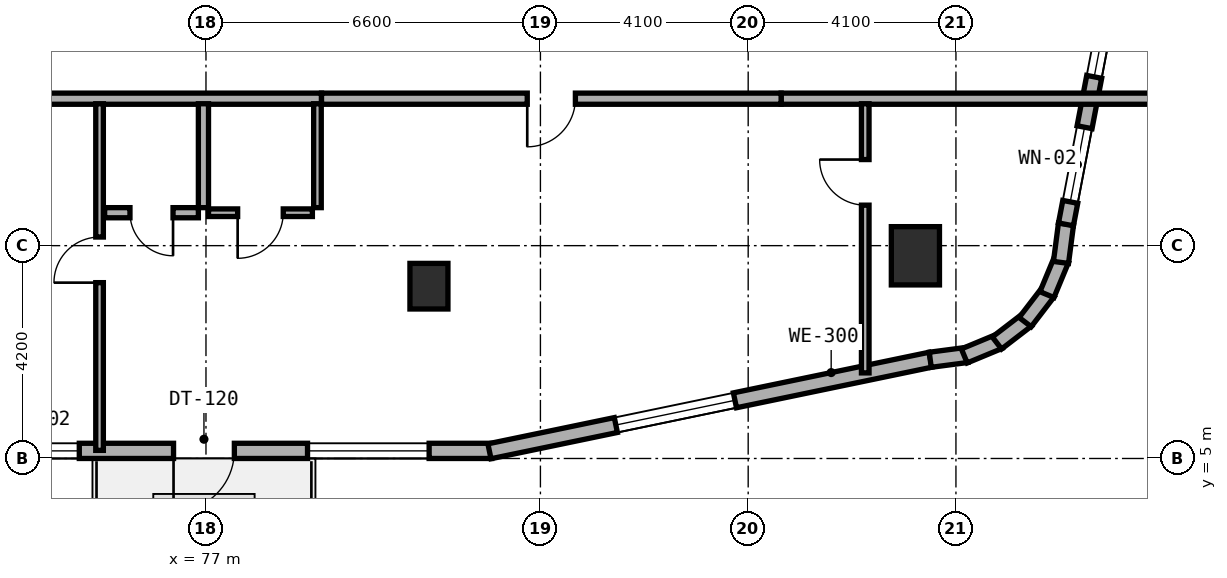
"""IFC4 building model, lengths in metres.
Left out: names, types, materials, properties, quantities, classifications, styles, units other than length and angle.
Written with IfcOpenShell. Run it as: python <this file> out.ifc"""

import sys

from ifc_helpers import new_model, si_unit, direction, frame, frame_2d, origin, origin_2d, place, context, subcontext, project, spatial, rectangle, extrude, element, fill, save


model = new_model("IFC4")
c1 = context("Model", 3, precision=1e-05, world=origin(), true_north=direction((0.0, 1.0)))
c2 = subcontext(c1, "Body", "Model", "MODEL_VIEW")
j1 = project(units=[si_unit("LENGTHUNIT", "METRE"), si_unit("PLANEANGLEUNIT", "RADIAN")], contexts=[c1])
p1 = place(None, origin())
s1 = spatial("IfcSite", under=j1, at=p1, CompositionType="ELEMENT")
p2 = place(p1, origin())
s2 = spatial("IfcBuilding", under=s1, at=p2, CompositionType="ELEMENT")
p3 = place(p2, frame((0.0, 0.0, 69.5)))
s3 = spatial("IfcBuildingStorey", under=s2, at=p3, CompositionType="ELEMENT", Elevation=69.5)
p4 = place(p3, frame((81.4, 8.4, 0.0), z_axis=(0.0, 0.0, 1.0), x_axis=(1.0, 0.0, 0.0)))
e1 = element("IfcColumn", 1, at=p4, inside=s3, PredefinedType="COLUMN", context=c2, shape_type="SweptSolid", body=[
    extrude(rectangle(XDim=0.75, YDim=0.9, at=origin_2d()), origin(), (0.0, 0.0, 1.0), 3.5),
])
p5 = place(p3, frame((91.0, 9.0, 0.0), z_axis=(0.0, 0.0, 1.0), x_axis=(1.0, 0.0, 0.0)))
e2 = element("IfcColumn", 2, at=p5, inside=s3, PredefinedType="COLUMN", context=c2, shape_type="SweptSolid", body=[
    extrude(rectangle(XDim=0.95, YDim=1.15, at=origin_2d()), origin(), (0.0, 0.0, 1.0), 3.5),
])
p6 = place(p3, frame((71.247, 5.15, 0.0), z_axis=(0.0, 0.0, 1.0), x_axis=(1.0, 0.0, 0.0)))
e3 = element("IfcWall", 3, at=p6, inside=s3, PredefinedType="STANDARD", context=c2, shape_type="SweptSolid", body=[
    extrude(rectangle(XDim=11.391, YDim=0.3, at=frame_2d((5.695, 0.0))), origin(), (0.0, 0.0, 1.0), 3.25),
])
p7 = place(p6, frame((5.113, 0.0, 0.0)))
e4 = element("IfcOpeningElement", 4, at=p7, cuts=e3, PredefinedType="OPENING", context=c2, shape_type="SweptSolid", body=[
    extrude(rectangle(XDim=1.2, YDim=2.15, at=frame_2d((0.6, 1.075))), frame((0.0, 0.16, 0.0), z_axis=(0.0, -1.0, 0.0), x_axis=(1.0, 0.0, 0.0)), (0.0, 0.0, 1.0), 0.32),
])
p8 = place(p6, frame((1.753, 0.0, 0.85)))
e5 = element("IfcOpeningElement", 5, at=p8, cuts=e3, PredefinedType="OPENING", context=c2, shape_type="SweptSolid", body=[
    extrude(rectangle(XDim=1.5, YDim=1.5, at=frame_2d((0.75, 0.75))), frame((0.0, 0.16, 0.0), z_axis=(0.0, -1.0, 0.0), x_axis=(1.0, 0.0, 0.0)), (0.0, 0.0, 1.0), 0.32),
])
p9 = place(p6, frame((7.757, 0.0, 0.8)))
e6 = element("IfcOpeningElement", 6, at=p9, cuts=e3, PredefinedType="OPENING", context=c2, shape_type="SweptSolid", body=[
    extrude(rectangle(XDim=2.4, YDim=1.6, at=frame_2d((1.2, 0.8))), frame((0.0, 0.16, 0.0), z_axis=(0.0, -1.0, 0.0), x_axis=(1.0, 0.0, 0.0)), (0.0, 0.0, 1.0), 0.32),
])
p10 = place(p3, frame((82.594, 5.142, 0.0), z_axis=(0.0, 0.0, 1.0), x_axis=(0.979125485139, 0.203256695712, 0.0)))
e7 = element("IfcWall", 7, at=p10, inside=s3, PredefinedType="STANDARD", context=c2, shape_type="SweptSolid", body=[
    extrude(rectangle(XDim=8.89, YDim=0.3, at=frame_2d((4.445, 0.0))), origin(), (0.0, 0.0, 1.0), 3.25),
])
p11 = place(p10, frame((2.548, 0.0, 0.8)))
e8 = element("IfcOpeningElement", 8, at=p11, cuts=e7, PredefinedType="OPENING", context=c2, shape_type="SweptSolid", body=[
    extrude(rectangle(XDim=2.4, YDim=1.6, at=frame_2d((1.2, 0.8))), frame((0.0, 0.16, 0.0), z_axis=(0.0, -1.0, 0.0), x_axis=(1.0, 0.0, 0.0)), (0.0, 0.0, 1.0), 0.32),
])
p12 = place(p3, frame((91.293, 6.948, 0.0), z_axis=(0.0, 0.0, 1.0), x_axis=(0.991486167159, 0.13021205909, 0.0)))
e9 = element("IfcWall", 9, at=p12, inside=s3, PredefinedType="STANDARD", context=c2, shape_type="SweptSolid", body=[
    extrude(rectangle(XDim=0.729, YDim=0.3, at=frame_2d((0.365, 0.0))), origin(), (0.0, 0.0, 1.0), 3.25),
])
for number, where, z_axis, x_axis in (
    (10, (91.965, 7.024, 0.0), (0.0, 0.0, 1.0), (0.924, 0.384, 0.0)),
    (11, (92.609, 7.279, 0.0), (0.0, 0.0, 1.0), (0.794, 0.608, 0.0)),
    (12, (93.166, 7.691, 0.0), (0.0, 0.0, 1.0), (0.609, 0.793, 0.0)),
):
    element("IfcWall", number, at=place(p3, frame(where, z_axis=z_axis, x_axis=x_axis)), inside=s3, PredefinedType="STANDARD", context=c2, shape_type="SweptSolid", body=[
        extrude(rectangle(XDim=0.746, YDim=0.3, at=frame_2d((0.373, 0.0))), origin(), (0.0, 0.0, 1.0), 3.25),
    ])
p13 = place(p3, frame((93.596, 8.234, 0.0), z_axis=(0.0, 0.0, 1.0), x_axis=(0.383430326427, 0.923569805037, 0.0)))
e13 = element("IfcWall", 13, at=p13, inside=s3, PredefinedType="STANDARD", context=c2, shape_type="SweptSolid", body=[
    extrude(rectangle(XDim=0.746, YDim=0.3, at=frame_2d((0.373, 0.0))), origin(), (0.0, 0.0, 1.0), 3.25),
])
p14 = place(p3, frame((93.873, 8.869, 0.0), z_axis=(0.0, 0.0, 1.0), x_axis=(0.129339184068, 0.991600411186, 0.0)))
e14 = element("IfcWall", 14, at=p14, inside=s3, PredefinedType="STANDARD", context=c2, shape_type="SweptSolid", body=[
    extrude(rectangle(XDim=0.764, YDim=0.3, at=frame_2d((0.382, 0.0))), origin(), (0.0, 0.0, 1.0), 3.25),
])
p15 = place(p3, frame((93.971, 9.62, 0.0), z_axis=(0.0, 0.0, 1.0), x_axis=(0.188087874316, 0.982152203854, 0.0)))
e15 = element("IfcWall", 15, at=p15, inside=s3, PredefinedType="STANDARD", context=c2, shape_type="SweptSolid", body=[
    extrude(rectangle(XDim=9.634, YDim=0.3, at=frame_2d((4.817, 0.0))), origin(), (0.0, 0.0, 1.0), 3.25),
])
p16 = place(p15, frame((0.452, 0.0, 0.85)))
e16 = element("IfcOpeningElement", 16, at=p16, cuts=e15, PredefinedType="OPENING", context=c2, shape_type="SweptSolid", body=[
    extrude(rectangle(XDim=1.5, YDim=1.5, at=frame_2d((0.75, 0.75))), frame((0.0, 0.16, 0.0), z_axis=(0.0, -1.0, 0.0), x_axis=(1.0, 0.0, 0.0)), (0.0, 0.0, 1.0), 0.32),
])
p17 = place(p15, frame((2.964, 0.0, 0.85)))
e17 = element("IfcOpeningElement", 17, at=p17, cuts=e15, PredefinedType="OPENING", context=c2, shape_type="SweptSolid", body=[
    extrude(rectangle(XDim=1.2, YDim=1.5, at=frame_2d((0.6, 0.75))), frame((0.0, 0.16, 0.0), z_axis=(0.0, -1.0, 0.0), x_axis=(1.0, 0.0, 0.0)), (0.0, 0.0, 1.0), 0.32),
])
p18 = place(p15, frame((5.979, 0.0, 0.8)))
e18 = element("IfcOpeningElement", 18, at=p18, cuts=e15, PredefinedType="OPENING", context=c2, shape_type="SweptSolid", body=[
    extrude(rectangle(XDim=2.4, YDim=1.6, at=frame_2d((1.2, 0.8))), frame((0.0, 0.16, 0.0), z_axis=(0.0, -1.0, 0.0), x_axis=(1.0, 0.0, 0.0)), (0.0, 0.0, 1.0), 0.32),
])
p19 = place(p3, frame((72.6, 12.1, 0.0), z_axis=(0.0, 0.0, 1.0), x_axis=(1.0, 0.0, 0.0)))
e19 = element("IfcWall", 19, at=p19, inside=s3, PredefinedType="SOLIDWALL", context=c2, shape_type="SweptSolid", body=[
    extrude(rectangle(XDim=6.68, YDim=0.22, at=frame_2d((3.34, 0.0))), origin(), (0.0, 0.0, 1.0), 2.725),
])
p20 = place(p3, frame((88.35, 12.1, 0.0), z_axis=(0.0, 0.0, 1.0), x_axis=(1.0, 0.0, 0.0)))
e20 = element("IfcWall", 20, at=p20, inside=s3, PredefinedType="SOLIDWALL", context=c2, shape_type="SweptSolid", body=[
    extrude(rectangle(XDim=7.41, YDim=0.22, at=frame_2d((3.705, 0.0))), origin(), (0.0, 0.0, 1.0), 2.865),
])
p21 = place(p3, frame((79.28, 12.1, 0.0), z_axis=(0.0, 0.0, 1.0), x_axis=(1.0, 0.0, 0.0)))
e21 = element("IfcWall", 21, at=p21, inside=s3, PredefinedType="SOLIDWALL", context=c2, shape_type="SweptSolid", body=[
    extrude(rectangle(XDim=9.07, YDim=0.22, at=frame_2d((4.535, 0.0))), origin(), (0.0, 0.0, 1.0), 2.725),
])
p22 = place(p21, frame((4.06, 0.0, 0.0)))
e22 = element("IfcOpeningElement", 22, at=p22, cuts=e21, PredefinedType="OPENING", context=c2, shape_type="SweptSolid", body=[
    extrude(rectangle(XDim=0.95, YDim=2.1, at=frame_2d((0.475, 1.05))), frame((0.0, 0.12, 0.0), z_axis=(0.0, -1.0, 0.0), x_axis=(1.0, 0.0, 0.0)), (0.0, 0.0, 1.0), 0.24),
])
p23 = place(p3, frame((74.9, 5.16, 0.0), z_axis=(0.0, 0.0, 1.0), x_axis=(0.0, 1.0, 0.0)))
e23 = element("IfcWall", 23, at=p23, inside=s3, PredefinedType="PARTITIONING", context=c2, shape_type="SweptSolid", body=[
    extrude(rectangle(XDim=6.84, YDim=0.15, at=frame_2d((3.42, 0.0))), origin(), (0.0, 0.0, 1.0), 2.865),
])
p24 = place(p23, frame((3.31, 0.0, 0.0)))
e24 = element("IfcOpeningElement", 24, at=p24, cuts=e23, PredefinedType="OPENING", context=c2, shape_type="SweptSolid", body=[
    extrude(rectangle(XDim=0.9, YDim=2.1, at=frame_2d((0.45, 1.05))), frame((0.0, 0.085, 0.0), z_axis=(0.0, -1.0, 0.0), x_axis=(1.0, 0.0, 0.0)), (0.0, 0.0, 1.0), 0.17),
])
p25 = place(p3, frame((90.01, 6.689, 0.0), z_axis=(0.0, 0.0, 1.0), x_axis=(0.0, 1.0, 0.0)))
e25 = element("IfcWall", 25, at=p25, inside=s3, PredefinedType="PARTITIONING", context=c2, shape_type="SweptSolid", body=[
    extrude(rectangle(XDim=5.311, YDim=0.15, at=frame_2d((2.656, 0.0))), origin(), (0.0, 0.0, 1.0), 2.865),
])
p26 = place(p25, frame((3.31, 0.0, 0.0)))
e26 = element("IfcOpeningElement", 26, at=p26, cuts=e25, PredefinedType="OPENING", context=c2, shape_type="SweptSolid", body=[
    extrude(rectangle(XDim=0.9, YDim=2.1, at=frame_2d((0.45, 1.05))), frame((0.0, 0.085, 0.0), z_axis=(0.0, -1.0, 0.0), x_axis=(1.0, 0.0, 0.0)), (0.0, 0.0, 1.0), 0.17),
])
p27 = place(p3, frame((76.95, 9.95, 0.0), z_axis=(0.0, 0.0, 1.0), x_axis=(0.0, 1.0, 0.0)))
e27 = element("IfcWall", 27, at=p27, inside=s3, PredefinedType="PLUMBINGWALL", context=c2, shape_type="SweptSolid", body=[
    extrude(rectangle(XDim=2.05, YDim=0.2, at=frame_2d((1.025, 0.0))), origin(), (0.0, 0.0, 1.0), 2.955),
])
p28 = place(p3, frame((79.2, 9.95, 0.0), z_axis=(0.0, 0.0, 1.0), x_axis=(0.0, 1.0, 0.0)))
e28 = element("IfcWall", 28, at=p28, inside=s3, PredefinedType="PARTITIONING", context=c2, shape_type="SweptSolid", body=[
    extrude(rectangle(XDim=2.05, YDim=0.15, at=frame_2d((1.025, 0.0))), origin(), (0.0, 0.0, 1.0), 2.955),
])
p29 = place(p3, frame((75.0, 9.85, 0.0), z_axis=(0.0, 0.0, 1.0), x_axis=(1.0, 0.0, 0.0)))
e29 = element("IfcWall", 29, at=p29, inside=s3, PredefinedType="PLUMBINGWALL", context=c2, shape_type="SweptSolid", body=[
    extrude(rectangle(XDim=1.85, YDim=0.2, at=frame_2d((0.925, 0.0))), origin(), (0.0, 0.0, 1.0), 3.22),
])
p30 = place(p29, frame((0.5, 0.0, 0.0)))
e30 = element("IfcOpeningElement", 30, at=p30, cuts=e29, PredefinedType="OPENING", context=c2, shape_type="SweptSolid", body=[
    extrude(rectangle(XDim=0.85, YDim=2.1, at=frame_2d((0.425, 1.05))), frame((0.0, 0.11, 0.0), z_axis=(0.0, -1.0, 0.0), x_axis=(1.0, 0.0, 0.0)), (0.0, 0.0, 1.0), 0.22),
])
p31 = place(p3, frame((77.05, 9.85, 0.0), z_axis=(0.0, 0.0, 1.0), x_axis=(1.0, 0.0, 0.0)))
e31 = element("IfcWall", 31, at=p31, inside=s3, PredefinedType="PARTITIONING", context=c2, shape_type="SweptSolid", body=[
    extrude(rectangle(XDim=2.05, YDim=0.15, at=frame_2d((1.025, 0.0))), origin(), (0.0, 0.0, 1.0), 3.22),
])
p32 = place(p31, frame((0.575, 0.0, 0.0)))
e32 = element("IfcOpeningElement", 32, at=p32, cuts=e31, PredefinedType="OPENING", context=c2, shape_type="SweptSolid", body=[
    extrude(rectangle(XDim=0.9, YDim=2.1, at=frame_2d((0.45, 1.05))), frame((0.0, 0.085, 0.0), z_axis=(0.0, -1.0, 0.0), x_axis=(1.0, 0.0, 0.0)), (0.0, 0.0, 1.0), 0.17),
])
p33 = place(p7, frame((1.2, 0.0, 0.0), z_axis=(0.0, 0.0, 1.0), x_axis=(-1.0, 0.0, 0.0)))
e33 = element("IfcDoor", 33, at=p33, inside=s3, OperationType="SINGLE_SWING_RIGHT", PredefinedType="DOOR", context=c2, shape_type="SweptSolid", body=[
    extrude(rectangle(XDim=1.2, YDim=2.15, at=frame_2d((0.6, 1.075))), frame((0.0, 0.025, 0.0), z_axis=(0.0, -1.0, 0.0), x_axis=(1.0, 0.0, 0.0)), (0.0, 0.0, 1.0), 0.05),
])
fill(e4, e33)
p34 = place(p8, origin())
e34 = element("IfcWindow", 34, at=p34, inside=s3, PartitioningType="SINGLE_PANEL", PredefinedType="WINDOW", context=c2, shape_type="SweptSolid", body=[
    extrude(rectangle(XDim=1.5, YDim=1.5, at=frame_2d((0.75, 0.75))), frame((0.0, 0.03, 0.0), z_axis=(0.0, -1.0, 0.0), x_axis=(1.0, 0.0, 0.0)), (0.0, 0.0, 1.0), 0.06),
])
fill(e5, e34)
p35 = place(p9, origin())
e35 = element("IfcWindow", 35, at=p35, inside=s3, PartitioningType="SINGLE_PANEL", PredefinedType="WINDOW", context=c2, shape_type="SweptSolid", body=[
    extrude(rectangle(XDim=2.4, YDim=1.6, at=frame_2d((1.2, 0.8))), frame((0.0, 0.03, 0.0), z_axis=(0.0, -1.0, 0.0), x_axis=(1.0, 0.0, 0.0)), (0.0, 0.0, 1.0), 0.06),
])
fill(e6, e35)
p36 = place(p11, origin())
e36 = element("IfcWindow", 36, at=p36, inside=s3, PartitioningType="SINGLE_PANEL", PredefinedType="WINDOW", context=c2, shape_type="SweptSolid", body=[
    extrude(rectangle(XDim=2.4, YDim=1.6, at=frame_2d((1.2, 0.8))), frame((0.0, 0.03, 0.0), z_axis=(0.0, -1.0, 0.0), x_axis=(1.0, 0.0, 0.0)), (0.0, 0.0, 1.0), 0.06),
])
fill(e8, e36)
p37 = place(p16, origin())
e37 = element("IfcWindow", 37, at=p37, inside=s3, PartitioningType="SINGLE_PANEL", PredefinedType="WINDOW", context=c2, shape_type="SweptSolid", body=[
    extrude(rectangle(XDim=1.5, YDim=1.5, at=frame_2d((0.75, 0.75))), frame((0.0, 0.03, 0.0), z_axis=(0.0, -1.0, 0.0), x_axis=(1.0, 0.0, 0.0)), (0.0, 0.0, 1.0), 0.06),
])
fill(e16, e37)
p38 = place(p17, origin())
e38 = element("IfcWindow", 38, at=p38, inside=s3, PartitioningType="SINGLE_PANEL", PredefinedType="WINDOW", context=c2, shape_type="SweptSolid", body=[
    extrude(rectangle(XDim=1.2, YDim=1.5, at=frame_2d((0.6, 0.75))), frame((0.0, 0.03, 0.0), z_axis=(0.0, -1.0, 0.0), x_axis=(1.0, 0.0, 0.0)), (0.0, 0.0, 1.0), 0.06),
])
fill(e17, e38)
p39 = place(p22, frame((0.95, 0.0, 0.0), z_axis=(0.0, 0.0, 1.0), x_axis=(-1.0, 0.0, 0.0)))
e39 = element("IfcDoor", 39, at=p39, inside=s3, OperationType="SINGLE_SWING_RIGHT", PredefinedType="DOOR", context=c2, shape_type="SweptSolid", body=[
    extrude(rectangle(XDim=0.95, YDim=2.1, at=frame_2d((0.475, 1.05))), frame((0.0, 0.025, 0.0), z_axis=(0.0, -1.0, 0.0), x_axis=(1.0, 0.0, 0.0)), (0.0, 0.0, 1.0), 0.05),
])
fill(e22, e39)
p40 = place(p24, origin())
e40 = element("IfcDoor", 40, at=p40, inside=s3, OperationType="SINGLE_SWING_LEFT", PredefinedType="DOOR", context=c2, shape_type="SweptSolid", body=[
    extrude(rectangle(XDim=0.9, YDim=2.1, at=frame_2d((0.45, 1.05))), frame((0.0, 0.025, 0.0), z_axis=(0.0, -1.0, 0.0), x_axis=(1.0, 0.0, 0.0)), (0.0, 0.0, 1.0), 0.05),
])
fill(e24, e40)
p41 = place(p26, origin())
e41 = element("IfcDoor", 41, at=p41, inside=s3, OperationType="SINGLE_SWING_RIGHT", PredefinedType="DOOR", context=c2, shape_type="SweptSolid", body=[
    extrude(rectangle(XDim=0.9, YDim=2.1, at=frame_2d((0.45, 1.05))), frame((0.0, 0.025, 0.0), z_axis=(0.0, -1.0, 0.0), x_axis=(1.0, 0.0, 0.0)), (0.0, 0.0, 1.0), 0.05),
])
fill(e26, e41)
p42 = place(p30, frame((0.85, 0.0, 0.0), z_axis=(0.0, 0.0, 1.0), x_axis=(-1.0, 0.0, 0.0)))
e42 = element("IfcDoor", 42, at=p42, inside=s3, OperationType="SINGLE_SWING_LEFT", PredefinedType="DOOR", context=c2, shape_type="SweptSolid", body=[
    extrude(rectangle(XDim=0.85, YDim=2.1, at=frame_2d((0.425, 1.05))), frame((0.0, 0.025, 0.0), z_axis=(0.0, -1.0, 0.0), x_axis=(1.0, 0.0, 0.0)), (0.0, 0.0, 1.0), 0.05),
])
fill(e30, e42)
p43 = place(p32, frame((0.9, 0.0, 0.0), z_axis=(0.0, 0.0, 1.0), x_axis=(-1.0, 0.0, 0.0)))
e43 = element("IfcDoor", 43, at=p43, inside=s3, OperationType="SINGLE_SWING_RIGHT", PredefinedType="DOOR", context=c2, shape_type="SweptSolid", body=[
    extrude(rectangle(XDim=0.9, YDim=2.1, at=frame_2d((0.45, 1.05))), frame((0.0, 0.025, 0.0), z_axis=(0.0, -1.0, 0.0), x_axis=(1.0, 0.0, 0.0)), (0.0, 0.0, 1.0), 0.05),
])
fill(e32, e43)
save(model, sys.argv[1])
